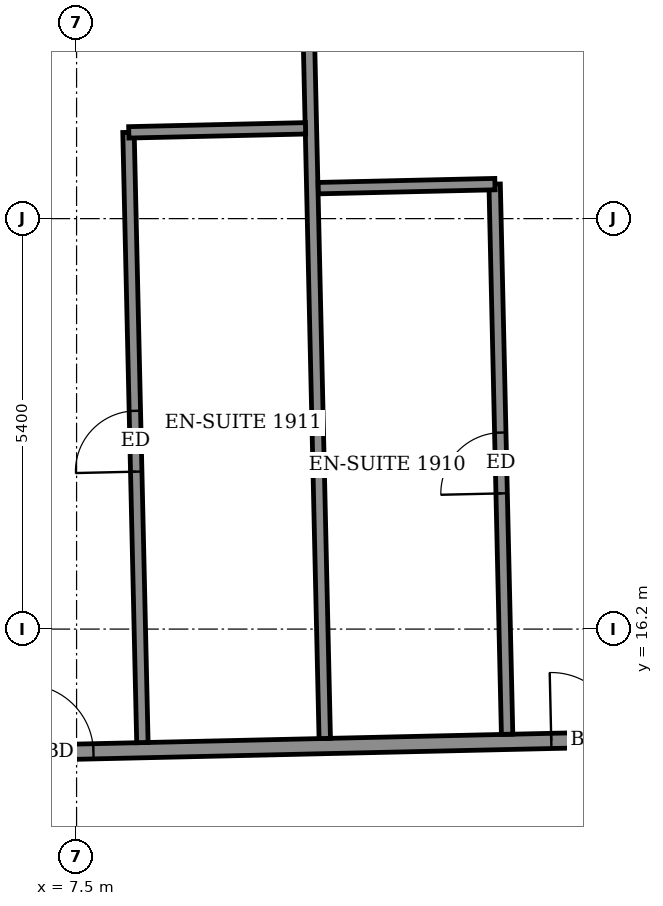
"""IFC4 building model, lengths in metres.
Left out: names, types, materials, properties, quantities, classifications, styles, units other than length and angle.
Written with IfcOpenShell. Run it as: python <this file> out.ifc"""

import sys

from ifc_helpers import new_model, si_unit, direction, frame, frame_2d, origin, place, context, subcontext, project, spatial, rectangle, extrude, element, fill, save


model = new_model("IFC4")
c1 = context("Model", 3, precision=1e-05, world=origin(), true_north=direction((0.0, 1.0)))
c2 = subcontext(c1, "Body", "Model", "MODEL_VIEW")
j1 = project(units=[si_unit("LENGTHUNIT", "METRE"), si_unit("PLANEANGLEUNIT", "RADIAN")], contexts=[c1])
p1 = place(None, origin())
s1 = spatial("IfcSite", under=j1, at=p1, CompositionType="ELEMENT")
p2 = place(p1, origin())
s2 = spatial("IfcBuilding", under=s1, at=p2, CompositionType="ELEMENT")
p3 = place(p2, frame((0.0, 0.0, 79.3)))
s3 = spatial("IfcBuildingStorey", under=s2, at=p3, CompositionType="ELEMENT", Elevation=79.3)
p4 = place(p3, frame((-24.895, 13.852, 0.0), z_axis=(0.0, 0.0, 1.0), x_axis=(0.999742765181, 0.02268046447, 0.0)))
e1 = element("IfcWall", 1, at=p4, inside=s3, PredefinedType="PARTITIONING", context=c2, shape_type="SweptSolid", body=[
    extrude(rectangle(XDim=52.422, YDim=0.2, at=frame_2d((26.211, 0.0))), origin(), (0.0, 0.0, 1.0), 3.05),
])
p5 = place(p4, frame((50.186, 0.0, 0.0)))
e2 = element("IfcOpeningElement", 2, at=p5, cuts=e1, PredefinedType="OPENING", context=c2, shape_type="SweptSolid", body=[
    extrude(rectangle(XDim=1.0, YDim=2.1, at=frame_2d((0.5, 1.05))), frame((0.0, 0.11, 0.0), z_axis=(0.0, -1.0, 0.0), x_axis=(1.0, 0.0, 0.0)), (0.0, 0.0, 1.0), 0.22),
])
p6 = place(p4, frame((45.175, 0.0, 0.0)))
e3 = element("IfcOpeningElement", 3, at=p6, cuts=e1, PredefinedType="OPENING", context=c2, shape_type="SweptSolid", body=[
    extrude(rectangle(XDim=0.9, YDim=2.1, at=frame_2d((0.45, 1.05))), frame((0.0, 0.11, 0.0), z_axis=(0.0, -1.0, 0.0), x_axis=(1.0, 0.0, 0.0)), (0.0, 0.0, 1.0), 0.22),
])
p7 = place(p4, frame((40.625, 0.0, 0.0)))
e4 = element("IfcOpeningElement", 4, at=p7, cuts=e1, PredefinedType="OPENING", context=c2, shape_type="SweptSolid", body=[
    extrude(rectangle(XDim=0.9, YDim=2.1, at=frame_2d((0.45, 1.05))), frame((0.0, 0.11, 0.0), z_axis=(0.0, -1.0, 0.0), x_axis=(1.0, 0.0, 0.0)), (0.0, 0.0, 1.0), 0.22),
])
p8 = place(p4, frame((38.65, 0.0, 0.0)))
e5 = element("IfcOpeningElement", 5, at=p8, cuts=e1, PredefinedType="OPENING", context=c2, shape_type="SweptSolid", body=[
    extrude(rectangle(XDim=0.9, YDim=2.1, at=frame_2d((0.45, 1.05))), frame((0.0, 0.11, 0.0), z_axis=(0.0, -1.0, 0.0), x_axis=(1.0, 0.0, 0.0)), (0.0, 0.0, 1.0), 0.22),
])
p9 = place(p4, frame((31.725, 0.0, 0.0)))
e6 = element("IfcOpeningElement", 6, at=p9, cuts=e1, PredefinedType="OPENING", context=c2, shape_type="SweptSolid", body=[
    extrude(rectangle(XDim=0.9, YDim=2.1, at=frame_2d((0.45, 1.05))), frame((0.0, 0.11, 0.0), z_axis=(0.0, -1.0, 0.0), x_axis=(1.0, 0.0, 0.0)), (0.0, 0.0, 1.0), 0.22),
])
p10 = place(p4, frame((29.575, 0.0, 0.0)))
e7 = element("IfcOpeningElement", 7, at=p10, cuts=e1, PredefinedType="OPENING", context=c2, shape_type="SweptSolid", body=[
    extrude(rectangle(XDim=0.9, YDim=2.1, at=frame_2d((0.45, 1.05))), frame((0.0, 0.11, 0.0), z_axis=(0.0, -1.0, 0.0), x_axis=(1.0, 0.0, 0.0)), (0.0, 0.0, 1.0), 0.22),
])
p11 = place(p4, frame((22.75, 0.0, 0.0)))
e8 = element("IfcOpeningElement", 8, at=p11, cuts=e1, PredefinedType="OPENING", context=c2, shape_type="SweptSolid", body=[
    extrude(rectangle(XDim=0.9, YDim=2.1, at=frame_2d((0.45, 1.05))), frame((0.0, 0.11, 0.0), z_axis=(0.0, -1.0, 0.0), x_axis=(1.0, 0.0, 0.0)), (0.0, 0.0, 1.0), 0.22),
])
p12 = place(p4, frame((20.75, 0.0, 0.0)))
e9 = element("IfcOpeningElement", 9, at=p12, cuts=e1, PredefinedType="OPENING", context=c2, shape_type="SweptSolid", body=[
    extrude(rectangle(XDim=0.9, YDim=2.1, at=frame_2d((0.45, 1.05))), frame((0.0, 0.11, 0.0), z_axis=(0.0, -1.0, 0.0), x_axis=(1.0, 0.0, 0.0)), (0.0, 0.0, 1.0), 0.22),
])
p13 = place(p4, frame((13.95, 0.0, 0.0)))
e10 = element("IfcOpeningElement", 10, at=p13, cuts=e1, PredefinedType="OPENING", context=c2, shape_type="SweptSolid", body=[
    extrude(rectangle(XDim=0.9, YDim=2.1, at=frame_2d((0.45, 1.05))), frame((0.0, 0.11, 0.0), z_axis=(0.0, -1.0, 0.0), x_axis=(1.0, 0.0, 0.0)), (0.0, 0.0, 1.0), 0.22),
])
p14 = place(p4, frame((11.85, 0.0, 0.0)))
e11 = element("IfcOpeningElement", 11, at=p14, cuts=e1, PredefinedType="OPENING", context=c2, shape_type="SweptSolid", body=[
    extrude(rectangle(XDim=0.9, YDim=2.1, at=frame_2d((0.45, 1.05))), frame((0.0, 0.11, 0.0), z_axis=(0.0, -1.0, 0.0), x_axis=(1.0, 0.0, 0.0)), (0.0, 0.0, 1.0), 0.22),
])
p15 = place(p4, frame((1.425, 0.0, 0.0)))
e12 = element("IfcOpeningElement", 12, at=p15, cuts=e1, PredefinedType="OPENING", context=c2, shape_type="SweptSolid", body=[
    extrude(rectangle(XDim=1.0, YDim=2.1, at=frame_2d((0.5, 1.05))), frame((0.0, 0.11, 0.0), z_axis=(0.0, -1.0, 0.0), x_axis=(1.0, 0.0, 0.0)), (0.0, 0.0, 1.0), 0.22),
])
p16 = place(p4, frame((6.925, 0.0, 0.0)))
e13 = element("IfcOpeningElement", 13, at=p16, cuts=e1, PredefinedType="OPENING", context=c2, shape_type="SweptSolid", body=[
    extrude(rectangle(XDim=0.9, YDim=2.1, at=frame_2d((0.45, 1.05))), frame((0.0, 0.11, 0.0), z_axis=(0.0, -1.0, 0.0), x_axis=(1.0, 0.0, 0.0)), (0.0, 0.0, 1.0), 0.22),
])
p17 = place(p3, frame((8.366, 14.707, 0.0), z_axis=(0.0, 0.0, 1.0), x_axis=(-0.022771820566, 0.999740688473, 0.0)))
e14 = element("IfcWall", 14, at=p17, inside=s3, PredefinedType="PARTITIONING", context=c2, shape_type="SweptSolid", body=[
    extrude(rectangle(XDim=8.03, YDim=0.15, at=frame_2d((4.015, 0.0))), origin(), (0.0, 0.0, 1.0), 3.05),
])
p18 = place(p17, frame((3.565, 0.0, 0.0)))
e15 = element("IfcOpeningElement", 15, at=p18, cuts=e14, PredefinedType="OPENING", context=c2, shape_type="SweptSolid", body=[
    extrude(rectangle(XDim=0.8, YDim=2.1, at=frame_2d((0.4, 1.05))), frame((0.0, 0.085, 0.0), z_axis=(0.0, -1.0, 0.0), x_axis=(1.0, 0.0, 0.0)), (0.0, 0.0, 1.0), 0.17),
])
p19 = place(p3, frame((10.765, 14.761, 0.0), z_axis=(0.0, 0.0, 1.0), x_axis=(-0.022661475803, 0.999743195783, 0.0)))
e16 = element("IfcWall", 16, at=p19, inside=s3, PredefinedType="PARTITIONING", context=c2, shape_type="SweptSolid", body=[
    extrude(rectangle(XDim=12.4, YDim=0.15, at=frame_2d((6.2, 0.0))), origin(), (0.0, 0.0, 1.0), 2.55),
])
p20 = place(p3, frame((13.164, 14.816, 0.0), z_axis=(0.0, 0.0, 1.0), x_axis=(-0.022660891034, 0.999743209038, 0.0)))
e17 = element("IfcWall", 17, at=p20, inside=s3, PredefinedType="PARTITIONING", context=c2, shape_type="SweptSolid", body=[
    extrude(rectangle(XDim=7.24, YDim=0.15, at=frame_2d((3.62, 0.0))), origin(), (0.0, 0.0, 1.0), 3.05),
])
p21 = place(p20, frame((3.17, 0.0, 0.0)))
e18 = element("IfcOpeningElement", 18, at=p21, cuts=e17, PredefinedType="OPENING", context=c2, shape_type="SweptSolid", body=[
    extrude(rectangle(XDim=0.8, YDim=2.1, at=frame_2d((0.4, 1.05))), frame((0.0, 0.085, 0.0), z_axis=(0.0, -1.0, 0.0), x_axis=(1.0, 0.0, 0.0)), (0.0, 0.0, 1.0), 0.17),
])
p22 = place(p3, frame((10.68, 22.001, 0.0), z_axis=(0.0, 0.0, 1.0), x_axis=(0.999740260747, 0.02279059109, 0.0)))
e19 = element("IfcWall", 19, at=p22, inside=s3, PredefinedType="PARTITIONING", context=c2, shape_type="SweptSolid", body=[
    extrude(rectangle(XDim=2.324, YDim=0.15, at=frame_2d((1.162, 0.0))), origin(), (0.0, 0.0, 1.0), 3.05),
])
p23 = place(p3, frame((8.187, 22.735, 0.0), z_axis=(0.0, 0.0, 1.0), x_axis=(0.999740478815, 0.022781023197, 0.0)))
e20 = element("IfcWall", 20, at=p23, inside=s3, PredefinedType="PARTITIONING", context=c2, shape_type="SweptSolid", body=[
    extrude(rectangle(XDim=2.325, YDim=0.15, at=frame_2d((1.163, 0.0))), origin(), (0.0, 0.0, 1.0), 3.05),
])
p24 = place(p8, origin())
e21 = element("IfcDoor", 21, at=p24, inside=s3, OperationType="SINGLE_SWING_RIGHT", PredefinedType="DOOR", context=c2, shape_type="SweptSolid", body=[
    extrude(rectangle(XDim=0.9, YDim=2.1, at=frame_2d((0.45, 1.05))), frame((0.0, 0.025, 0.0), z_axis=(0.0, -1.0, 0.0), x_axis=(1.0, 0.0, 0.0)), (0.0, 0.0, 1.0), 0.05),
])
fill(e5, e21)
p25 = place(p21, origin())
e22 = element("IfcDoor", 22, at=p25, inside=s3, OperationType="SINGLE_SWING_RIGHT", PredefinedType="DOOR", context=c2, shape_type="SweptSolid", body=[
    extrude(rectangle(XDim=0.8, YDim=2.1, at=frame_2d((0.4, 1.05))), frame((0.0, 0.025, 0.0), z_axis=(0.0, -1.0, 0.0), x_axis=(1.0, 0.0, 0.0)), (0.0, 0.0, 1.0), 0.05),
])
fill(e18, e22)
p26 = place(p9, origin())
e23 = element("IfcDoor", 23, at=p26, inside=s3, OperationType="SINGLE_SWING_LEFT", PredefinedType="DOOR", context=c2, shape_type="SweptSolid", body=[
    extrude(rectangle(XDim=0.9, YDim=2.1, at=frame_2d((0.45, 1.05))), frame((0.0, 0.025, 0.0), z_axis=(0.0, -1.0, 0.0), x_axis=(1.0, 0.0, 0.0)), (0.0, 0.0, 1.0), 0.05),
])
fill(e6, e23)
p27 = place(p18, origin())
e24 = element("IfcDoor", 24, at=p27, inside=s3, OperationType="SINGLE_SWING_LEFT", PredefinedType="DOOR", context=c2, shape_type="SweptSolid", body=[
    extrude(rectangle(XDim=0.8, YDim=2.1, at=frame_2d((0.4, 1.05))), frame((0.0, 0.025, 0.0), z_axis=(0.0, -1.0, 0.0), x_axis=(1.0, 0.0, 0.0)), (0.0, 0.0, 1.0), 0.05),
])
fill(e15, e24)
save(model, sys.argv[1])
